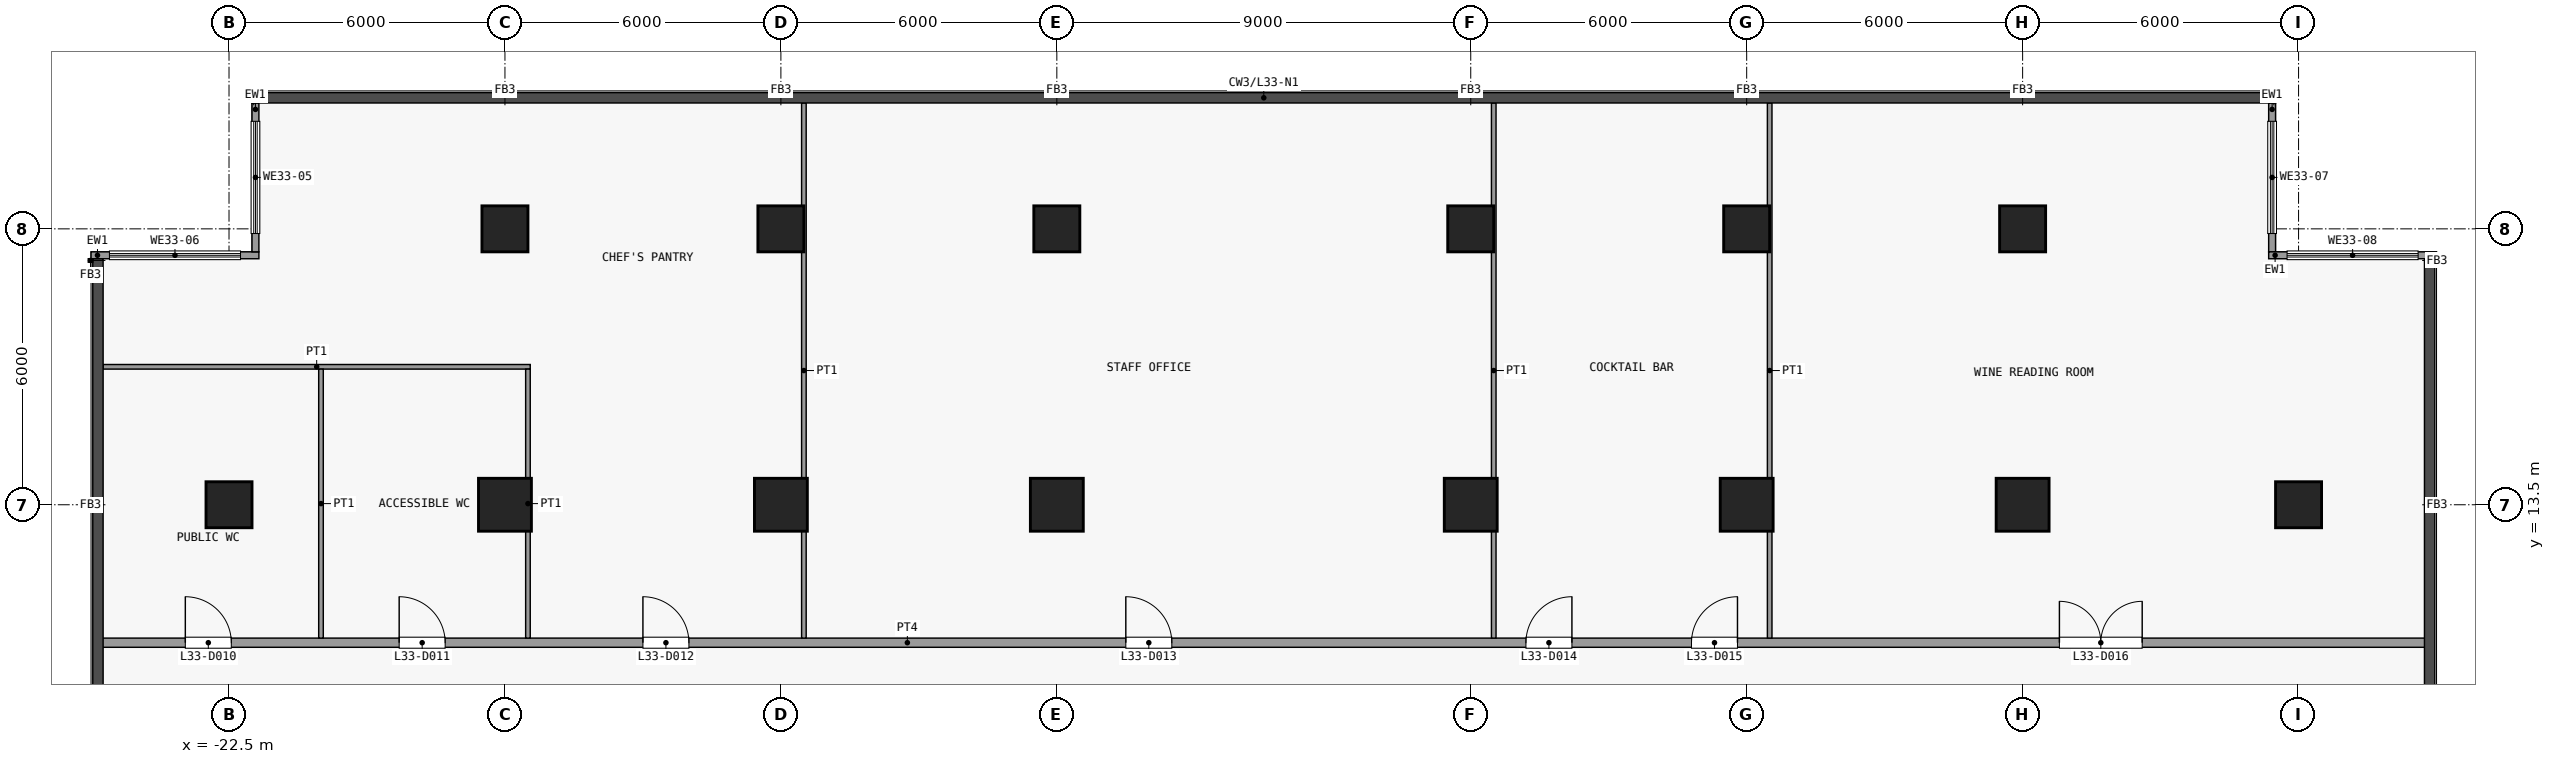
"""IFC4 building model, lengths in metres.
Left out: names, types, materials, properties, quantities, classifications, styles, units other than length and angle.
Written with IfcOpenShell. Run it as: python <this file> out.ifc"""

import sys

from ifc_helpers import new_model, si_unit, direction, frame, frame_2d, origin, origin_2d, place, context, subcontext, project, spatial, rectangle, extrude, element, fill, save


model = new_model("IFC4")
c1 = context("Model", 3, precision=1e-05, world=origin(), true_north=direction((0.0, 1.0)))
c2 = subcontext(c1, "Body", "Model", "MODEL_VIEW")
j1 = project(units=[si_unit("LENGTHUNIT", "METRE"), si_unit("PLANEANGLEUNIT", "RADIAN")], contexts=[c1])
p1 = place(None, origin())
s1 = spatial("IfcSite", under=j1, at=p1, CompositionType="ELEMENT")
p2 = place(p1, origin())
s2 = spatial("IfcBuilding", under=s1, at=p2, CompositionType="ELEMENT")
p3 = place(p2, frame((0.0, 0.0, 133.9)))
s3 = spatial("IfcBuildingStorey", under=s2, at=p3, CompositionType="ELEMENT", Elevation=133.9)
p4 = place(p3, frame((-22.5, 13.5, 0.0), z_axis=(0.0, 0.0, 1.0), x_axis=(1.0, 0.0, 0.0)))
e1 = element("IfcColumn", 1, at=p4, inside=s3, PredefinedType="COLUMN", context=c2, shape_type="SweptSolid", body=[
    extrude(rectangle(XDim=1.0, YDim=1.0, at=origin_2d()), origin(), (0.0, 0.0, 1.0), 5.0),
])
p5 = place(p3, frame((-16.5, 13.5, 0.0), z_axis=(0.0, 0.0, 1.0), x_axis=(1.0, 0.0, 0.0)))
e2 = element("IfcColumn", 2, at=p5, inside=s3, PredefinedType="COLUMN", context=c2, shape_type="SweptSolid", body=[
    extrude(rectangle(XDim=1.15, YDim=1.15, at=origin_2d()), origin(), (0.0, 0.0, 1.0), 5.0),
])
p6 = place(p3, frame((-16.5, 19.5, 0.0), z_axis=(0.0, 0.0, 1.0), x_axis=(1.0, 0.0, 0.0)))
e3 = element("IfcColumn", 3, at=p6, inside=s3, PredefinedType="COLUMN", context=c2, shape_type="SweptSolid", body=[
    extrude(rectangle(XDim=1.0, YDim=1.0, at=origin_2d()), origin(), (0.0, 0.0, 1.0), 5.0),
])
p7 = place(p3, frame((-10.5, 13.5, 0.0), z_axis=(0.0, 0.0, 1.0), x_axis=(1.0, 0.0, 0.0)))
e4 = element("IfcColumn", 4, at=p7, inside=s3, PredefinedType="COLUMN", context=c2, shape_type="SweptSolid", body=[
    extrude(rectangle(XDim=1.15, YDim=1.15, at=origin_2d()), origin(), (0.0, 0.0, 1.0), 5.0),
])
p8 = place(p3, frame((-10.5, 19.5, 0.0), z_axis=(0.0, 0.0, 1.0), x_axis=(1.0, 0.0, 0.0)))
e5 = element("IfcColumn", 5, at=p8, inside=s3, PredefinedType="COLUMN", context=c2, shape_type="SweptSolid", body=[
    extrude(rectangle(XDim=1.0, YDim=1.0, at=origin_2d()), origin(), (0.0, 0.0, 1.0), 5.0),
])
p9 = place(p3, frame((-4.5, 13.5, 0.0), z_axis=(0.0, 0.0, 1.0), x_axis=(1.0, 0.0, 0.0)))
e6 = element("IfcColumn", 6, at=p9, inside=s3, PredefinedType="COLUMN", context=c2, shape_type="SweptSolid", body=[
    extrude(rectangle(XDim=1.15, YDim=1.15, at=origin_2d()), origin(), (0.0, 0.0, 1.0), 5.0),
])
p10 = place(p3, frame((-4.5, 19.5, 0.0), z_axis=(0.0, 0.0, 1.0), x_axis=(1.0, 0.0, 0.0)))
e7 = element("IfcColumn", 7, at=p10, inside=s3, PredefinedType="COLUMN", context=c2, shape_type="SweptSolid", body=[
    extrude(rectangle(XDim=1.0, YDim=1.0, at=origin_2d()), origin(), (0.0, 0.0, 1.0), 5.0),
])
p11 = place(p3, frame((4.5, 13.5, 0.0), z_axis=(0.0, 0.0, 1.0), x_axis=(1.0, 0.0, 0.0)))
e8 = element("IfcColumn", 8, at=p11, inside=s3, PredefinedType="COLUMN", context=c2, shape_type="SweptSolid", body=[
    extrude(rectangle(XDim=1.15, YDim=1.15, at=origin_2d()), origin(), (0.0, 0.0, 1.0), 5.0),
])
p12 = place(p3, frame((4.5, 19.5, 0.0), z_axis=(0.0, 0.0, 1.0), x_axis=(1.0, 0.0, 0.0)))
e9 = element("IfcColumn", 9, at=p12, inside=s3, PredefinedType="COLUMN", context=c2, shape_type="SweptSolid", body=[
    extrude(rectangle(XDim=1.0, YDim=1.0, at=origin_2d()), origin(), (0.0, 0.0, 1.0), 5.0),
])
p13 = place(p3, frame((10.5, 13.5, 0.0), z_axis=(0.0, 0.0, 1.0), x_axis=(1.0, 0.0, 0.0)))
e10 = element("IfcColumn", 10, at=p13, inside=s3, PredefinedType="COLUMN", context=c2, shape_type="SweptSolid", body=[
    extrude(rectangle(XDim=1.15, YDim=1.15, at=origin_2d()), origin(), (0.0, 0.0, 1.0), 5.0),
])
p14 = place(p3, frame((10.5, 19.5, 0.0), z_axis=(0.0, 0.0, 1.0), x_axis=(1.0, 0.0, 0.0)))
e11 = element("IfcColumn", 11, at=p14, inside=s3, PredefinedType="COLUMN", context=c2, shape_type="SweptSolid", body=[
    extrude(rectangle(XDim=1.0, YDim=1.0, at=origin_2d()), origin(), (0.0, 0.0, 1.0), 5.0),
])
p15 = place(p3, frame((16.5, 13.5, 0.0), z_axis=(0.0, 0.0, 1.0), x_axis=(1.0, 0.0, 0.0)))
e12 = element("IfcColumn", 12, at=p15, inside=s3, PredefinedType="COLUMN", context=c2, shape_type="SweptSolid", body=[
    extrude(rectangle(XDim=1.15, YDim=1.15, at=origin_2d()), origin(), (0.0, 0.0, 1.0), 5.0),
])
for number, where, z_axis, x_axis in (
    (13, (16.5, 19.5, 0.0), (0.0, 0.0, 1.0), (1.0, 0.0, 0.0)),
    (14, (22.5, 13.5, 0.0), (0.0, 0.0, 1.0), (1.0, 0.0, 0.0)),
):
    element("IfcColumn", number, at=place(p3, frame(where, z_axis=z_axis, x_axis=x_axis)), inside=s3, PredefinedType="COLUMN", context=c2, shape_type="SweptSolid", body=[
        extrude(rectangle(XDim=1.0, YDim=1.0, at=origin_2d()), origin(), (0.0, 0.0, 1.0), 5.0),
    ])
p16 = place(p3, frame((-21.925, 19.0, 0.0), z_axis=(0.0, 0.0, 1.0), x_axis=(0.0, 1.0, 0.0)))
e15 = element("IfcWall", 15, at=p16, inside=s3, PredefinedType="SOLIDWALL", context=c2, shape_type="SweptSolid", body=[
    extrude(rectangle(XDim=3.238, YDim=0.15, at=frame_2d((1.619, 0.0))), origin(), (0.0, 0.0, 1.0), 4.7),
])
p17 = place(p16, frame((0.399, 0.0, 0.9)))
e16 = element("IfcOpeningElement", 16, at=p17, cuts=e15, PredefinedType="OPENING", context=c2, shape_type="SweptSolid", body=[
    extrude(rectangle(XDim=2.44, YDim=2.4, at=frame_2d((1.22, 1.2))), frame((0.0, 0.085, 0.0), z_axis=(0.0, -1.0, 0.0), x_axis=(1.0, 0.0, 0.0)), (0.0, 0.0, 1.0), 0.17),
])
p18 = place(p3, frame((-25.5, 18.925, 0.0), z_axis=(0.0, 0.0, 1.0), x_axis=(1.0, 0.0, 0.0)))
e17 = element("IfcWall", 17, at=p18, inside=s3, PredefinedType="SOLIDWALL", context=c2, shape_type="SweptSolid", body=[
    extrude(rectangle(XDim=3.65, YDim=0.15, at=frame_2d((1.825, 0.0))), origin(), (0.0, 0.0, 1.0), 4.7),
])
p19 = place(p18, frame((0.4, 0.0, 0.9)))
e18 = element("IfcOpeningElement", 18, at=p19, cuts=e17, PredefinedType="OPENING", context=c2, shape_type="SweptSolid", body=[
    extrude(rectangle(XDim=2.85, YDim=2.4, at=frame_2d((1.425, 1.2))), frame((0.0, 0.085, 0.0), z_axis=(0.0, -1.0, 0.0), x_axis=(1.0, 0.0, 0.0)), (0.0, 0.0, 1.0), 0.17),
])
p20 = place(p3, frame((21.925, 22.238, 0.0), z_axis=(0.0, 0.0, 1.0), x_axis=(0.0, -1.0, 0.0)))
e19 = element("IfcWall", 19, at=p20, inside=s3, PredefinedType="SOLIDWALL", context=c2, shape_type="SweptSolid", body=[
    extrude(rectangle(XDim=3.238, YDim=0.15, at=frame_2d((1.619, 0.0))), origin(), (0.0, 0.0, 1.0), 4.7),
])
p21 = place(p20, frame((0.399, 0.0, 0.9)))
e20 = element("IfcOpeningElement", 20, at=p21, cuts=e19, PredefinedType="OPENING", context=c2, shape_type="SweptSolid", body=[
    extrude(rectangle(XDim=2.44, YDim=2.4, at=frame_2d((1.22, 1.2))), frame((0.0, 0.085, 0.0), z_axis=(0.0, -1.0, 0.0), x_axis=(1.0, 0.0, 0.0)), (0.0, 0.0, 1.0), 0.17),
])
p22 = place(p3, frame((21.85, 18.925, 0.0), z_axis=(0.0, 0.0, 1.0), x_axis=(1.0, 0.0, 0.0)))
e21 = element("IfcWall", 21, at=p22, inside=s3, PredefinedType="SOLIDWALL", context=c2, shape_type="SweptSolid", body=[
    extrude(rectangle(XDim=3.65, YDim=0.15, at=frame_2d((1.825, 0.0))), origin(), (0.0, 0.0, 1.0), 4.7),
])
p23 = place(p22, frame((0.4, 0.0, 0.9)))
e22 = element("IfcOpeningElement", 22, at=p23, cuts=e21, PredefinedType="OPENING", context=c2, shape_type="SweptSolid", body=[
    extrude(rectangle(XDim=2.85, YDim=2.4, at=frame_2d((1.425, 1.2))), frame((0.0, 0.085, 0.0), z_axis=(0.0, -1.0, 0.0), x_axis=(1.0, 0.0, 0.0)), (0.0, 0.0, 1.0), 0.17),
])
p24 = place(p3, frame((-25.35, 10.5, 0.0), z_axis=(0.0, 0.0, 1.0), x_axis=(1.0, 0.0, 0.0)))
e23 = element("IfcWall", 23, at=p24, inside=s3, PredefinedType="PARTITIONING", context=c2, shape_type="SweptSolid", body=[
    extrude(rectangle(XDim=50.7, YDim=0.2, at=frame_2d((25.35, 0.0))), origin(), (0.0, 0.0, 1.0), 4.7),
])
p25 = place(p24, frame((1.9, 0.0, 0.0)))
e24 = element("IfcOpeningElement", 24, at=p25, cuts=e23, PredefinedType="OPENING", context=c2, shape_type="SweptSolid", body=[
    extrude(rectangle(XDim=1.0, YDim=2.1, at=frame_2d((0.5, 1.05))), frame((0.0, 0.11, 0.0), z_axis=(0.0, -1.0, 0.0), x_axis=(1.0, 0.0, 0.0)), (0.0, 0.0, 1.0), 0.22),
])
p26 = place(p24, frame((6.55, 0.0, 0.0)))
e25 = element("IfcOpeningElement", 25, at=p26, cuts=e23, PredefinedType="OPENING", context=c2, shape_type="SweptSolid", body=[
    extrude(rectangle(XDim=1.0, YDim=2.1, at=frame_2d((0.5, 1.05))), frame((0.0, 0.11, 0.0), z_axis=(0.0, -1.0, 0.0), x_axis=(1.0, 0.0, 0.0)), (0.0, 0.0, 1.0), 0.22),
])
p27 = place(p24, frame((11.85, 0.0, 0.0)))
e26 = element("IfcOpeningElement", 26, at=p27, cuts=e23, PredefinedType="OPENING", context=c2, shape_type="SweptSolid", body=[
    extrude(rectangle(XDim=1.0, YDim=2.1, at=frame_2d((0.5, 1.05))), frame((0.0, 0.11, 0.0), z_axis=(0.0, -1.0, 0.0), x_axis=(1.0, 0.0, 0.0)), (0.0, 0.0, 1.0), 0.22),
])
p28 = place(p24, frame((22.35, 0.0, 0.0)))
e27 = element("IfcOpeningElement", 27, at=p28, cuts=e23, PredefinedType="OPENING", context=c2, shape_type="SweptSolid", body=[
    extrude(rectangle(XDim=1.0, YDim=2.1, at=frame_2d((0.5, 1.05))), frame((0.0, 0.11, 0.0), z_axis=(0.0, -1.0, 0.0), x_axis=(1.0, 0.0, 0.0)), (0.0, 0.0, 1.0), 0.22),
])
p29 = place(p24, frame((31.05, 0.0, 0.0)))
e28 = element("IfcOpeningElement", 28, at=p29, cuts=e23, PredefinedType="OPENING", context=c2, shape_type="SweptSolid", body=[
    extrude(rectangle(XDim=1.0, YDim=2.1, at=frame_2d((0.5, 1.05))), frame((0.0, 0.11, 0.0), z_axis=(0.0, -1.0, 0.0), x_axis=(1.0, 0.0, 0.0)), (0.0, 0.0, 1.0), 0.22),
])
p30 = place(p24, frame((34.65, 0.0, 0.0)))
e29 = element("IfcOpeningElement", 29, at=p30, cuts=e23, PredefinedType="OPENING", context=c2, shape_type="SweptSolid", body=[
    extrude(rectangle(XDim=1.0, YDim=2.1, at=frame_2d((0.5, 1.05))), frame((0.0, 0.11, 0.0), z_axis=(0.0, -1.0, 0.0), x_axis=(1.0, 0.0, 0.0)), (0.0, 0.0, 1.0), 0.22),
])
p31 = place(p24, frame((42.65, 0.0, 0.0)))
e30 = element("IfcOpeningElement", 30, at=p31, cuts=e23, PredefinedType="OPENING", context=c2, shape_type="SweptSolid", body=[
    extrude(rectangle(XDim=1.8, YDim=2.1, at=frame_2d((0.9, 1.05))), frame((0.0, 0.11, 0.0), z_axis=(0.0, -1.0, 0.0), x_axis=(1.0, 0.0, 0.0)), (0.0, 0.0, 1.0), 0.22),
])
p32 = place(p3, frame((-25.238, 16.5, 0.0), z_axis=(0.0, 0.0, 1.0), x_axis=(1.0, 0.0, 0.0)))
e31 = element("IfcWall", 31, at=p32, inside=s3, PredefinedType="PARTITIONING", context=c2, shape_type="SweptSolid", body=[
    extrude(rectangle(XDim=9.288, YDim=0.1, at=frame_2d((4.644, 0.0))), origin(), (0.0, 0.0, 1.0), 4.7),
])
for number, where, z_axis, x_axis in (
    (32, (-20.5, 10.6, 0.0), (0.0, 0.0, 1.0), (0.0, 1.0, 0.0)),
    (33, (-16.0, 10.6, 0.0), (0.0, 0.0, 1.0), (0.0, 1.0, 0.0)),
):
    element("IfcWall", number, at=place(p3, frame(where, z_axis=z_axis, x_axis=x_axis)), inside=s3, PredefinedType="PARTITIONING", context=c2, shape_type="SweptSolid", body=[
        extrude(rectangle(XDim=5.85, YDim=0.1, at=frame_2d((2.925, 0.0))), origin(), (0.0, 0.0, 1.0), 4.7),
    ])
for number, where, z_axis, x_axis in (
    (34, (-10.0, 10.6, 0.0), (0.0, 0.0, 1.0), (0.0, 1.0, 0.0)),
    (35, (5.0, 10.6, 0.0), (0.0, 0.0, 1.0), (0.0, 1.0, 0.0)),
    (36, (11.0, 10.6, 0.0), (0.0, 0.0, 1.0), (0.0, 1.0, 0.0)),
):
    element("IfcWall", number, at=place(p3, frame(where, z_axis=z_axis, x_axis=x_axis)), inside=s3, PredefinedType="PARTITIONING", context=c2, shape_type="SweptSolid", body=[
        extrude(rectangle(XDim=11.637, YDim=0.1, at=frame_2d((5.819, 0.0))), origin(), (0.0, 0.0, 1.0), 4.7),
    ])
p33 = place(p17, origin())
e37 = element("IfcWindow", 37, at=p33, inside=s3, PartitioningType="SINGLE_PANEL", PredefinedType="WINDOW", context=c2, shape_type="SweptSolid", body=[
    extrude(rectangle(XDim=2.44, YDim=2.4, at=frame_2d((1.22, 1.2))), frame((0.0, 0.03, 0.0), z_axis=(0.0, -1.0, 0.0), x_axis=(1.0, 0.0, 0.0)), (0.0, 0.0, 1.0), 0.06),
])
fill(e16, e37)
p34 = place(p19, origin())
e38 = element("IfcWindow", 38, at=p34, inside=s3, PartitioningType="SINGLE_PANEL", PredefinedType="WINDOW", context=c2, shape_type="SweptSolid", body=[
    extrude(rectangle(XDim=2.85, YDim=2.4, at=frame_2d((1.425, 1.2))), frame((0.0, 0.03, 0.0), z_axis=(0.0, -1.0, 0.0), x_axis=(1.0, 0.0, 0.0)), (0.0, 0.0, 1.0), 0.06),
])
fill(e18, e38)
p35 = place(p21, origin())
e39 = element("IfcWindow", 39, at=p35, inside=s3, PartitioningType="SINGLE_PANEL", PredefinedType="WINDOW", context=c2, shape_type="SweptSolid", body=[
    extrude(rectangle(XDim=2.44, YDim=2.4, at=frame_2d((1.22, 1.2))), frame((0.0, 0.03, 0.0), z_axis=(0.0, -1.0, 0.0), x_axis=(1.0, 0.0, 0.0)), (0.0, 0.0, 1.0), 0.06),
])
fill(e20, e39)
p36 = place(p23, origin())
e40 = element("IfcWindow", 40, at=p36, inside=s3, PartitioningType="SINGLE_PANEL", PredefinedType="WINDOW", context=c2, shape_type="SweptSolid", body=[
    extrude(rectangle(XDim=2.85, YDim=2.4, at=frame_2d((1.425, 1.2))), frame((0.0, 0.03, 0.0), z_axis=(0.0, -1.0, 0.0), x_axis=(1.0, 0.0, 0.0)), (0.0, 0.0, 1.0), 0.06),
])
fill(e22, e40)
p37 = place(p25, origin())
e41 = element("IfcDoor", 41, at=p37, inside=s3, OperationType="SINGLE_SWING_RIGHT", PredefinedType="DOOR", context=c2, shape_type="SweptSolid", body=[
    extrude(rectangle(XDim=1.0, YDim=2.1, at=frame_2d((0.5, 1.05))), frame((0.0, 0.025, 0.0), z_axis=(0.0, -1.0, 0.0), x_axis=(1.0, 0.0, 0.0)), (0.0, 0.0, 1.0), 0.05),
])
fill(e24, e41)
p38 = place(p26, origin())
e42 = element("IfcDoor", 42, at=p38, inside=s3, OperationType="SINGLE_SWING_RIGHT", PredefinedType="DOOR", context=c2, shape_type="SweptSolid", body=[
    extrude(rectangle(XDim=1.0, YDim=2.1, at=frame_2d((0.5, 1.05))), frame((0.0, 0.025, 0.0), z_axis=(0.0, -1.0, 0.0), x_axis=(1.0, 0.0, 0.0)), (0.0, 0.0, 1.0), 0.05),
])
fill(e25, e42)
p39 = place(p27, origin())
e43 = element("IfcDoor", 43, at=p39, inside=s3, OperationType="SINGLE_SWING_RIGHT", PredefinedType="DOOR", context=c2, shape_type="SweptSolid", body=[
    extrude(rectangle(XDim=1.0, YDim=2.1, at=frame_2d((0.5, 1.05))), frame((0.0, 0.025, 0.0), z_axis=(0.0, -1.0, 0.0), x_axis=(1.0, 0.0, 0.0)), (0.0, 0.0, 1.0), 0.05),
])
fill(e26, e43)
p40 = place(p28, origin())
e44 = element("IfcDoor", 44, at=p40, inside=s3, OperationType="SINGLE_SWING_RIGHT", PredefinedType="DOOR", context=c2, shape_type="SweptSolid", body=[
    extrude(rectangle(XDim=1.0, YDim=2.1, at=frame_2d((0.5, 1.05))), frame((0.0, 0.025, 0.0), z_axis=(0.0, -1.0, 0.0), x_axis=(1.0, 0.0, 0.0)), (0.0, 0.0, 1.0), 0.05),
])
fill(e27, e44)
p41 = place(p29, origin())
e45 = element("IfcDoor", 45, at=p41, inside=s3, OperationType="SINGLE_SWING_LEFT", PredefinedType="DOOR", context=c2, shape_type="SweptSolid", body=[
    extrude(rectangle(XDim=1.0, YDim=2.1, at=frame_2d((0.5, 1.05))), frame((0.0, 0.025, 0.0), z_axis=(0.0, -1.0, 0.0), x_axis=(1.0, 0.0, 0.0)), (0.0, 0.0, 1.0), 0.05),
])
fill(e28, e45)
p42 = place(p30, origin())
e46 = element("IfcDoor", 46, at=p42, inside=s3, OperationType="SINGLE_SWING_LEFT", PredefinedType="DOOR", context=c2, shape_type="SweptSolid", body=[
    extrude(rectangle(XDim=1.0, YDim=2.1, at=frame_2d((0.5, 1.05))), frame((0.0, 0.025, 0.0), z_axis=(0.0, -1.0, 0.0), x_axis=(1.0, 0.0, 0.0)), (0.0, 0.0, 1.0), 0.05),
])
fill(e29, e46)
p43 = place(p31, origin())
e47 = element("IfcDoor", 47, at=p43, inside=s3, OperationType="DOUBLE_DOOR_SINGLE_SWING", PredefinedType="DOOR", context=c2, shape_type="SweptSolid", body=[
    extrude(rectangle(XDim=1.8, YDim=2.1, at=frame_2d((0.9, 1.05))), frame((0.0, 0.025, 0.0), z_axis=(0.0, -1.0, 0.0), x_axis=(1.0, 0.0, 0.0)), (0.0, 0.0, 1.0), 0.05),
])
fill(e30, e47)
save(model, sys.argv[1])
